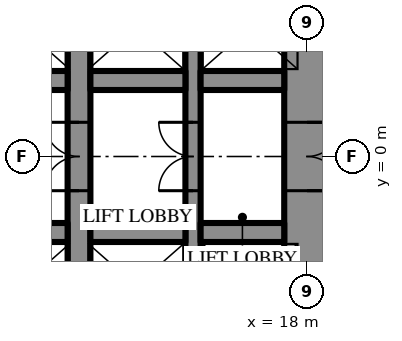
"""IFC4 building model, lengths in metres.
Left out: names, types, materials, properties, quantities, classifications, styles, units other than length and angle.
Written with IfcOpenShell. Run it as: python <this file> out.ifc"""

import sys

from ifc_helpers import new_model, si_unit, direction, frame, frame_2d, origin, place, context, subcontext, project, spatial, rectangle, extrude, element, fill, save


model = new_model("IFC4")
c1 = context("Model", 3, precision=1e-05, world=origin(), true_north=direction((0.0, 1.0)))
c2 = subcontext(c1, "Body", "Model", "MODEL_VIEW")
j1 = project(units=[si_unit("LENGTHUNIT", "METRE"), si_unit("PLANEANGLEUNIT", "RADIAN")], contexts=[c1])
p1 = place(None, origin())
s1 = spatial("IfcSite", under=j1, at=p1, CompositionType="ELEMENT")
p2 = place(p1, origin())
s2 = spatial("IfcBuilding", under=s1, at=p2, CompositionType="ELEMENT")
p3 = place(p2, frame((0.0, 0.0, 27.7)))
s3 = spatial("IfcBuildingStorey", under=s2, at=p3, CompositionType="ELEMENT", Elevation=27.7)
p4 = place(p3, frame((18.0, -10.7, 0.0), z_axis=(0.0, 0.0, 1.0), x_axis=(0.0, 1.0, 0.0)))
e1 = element("IfcWall", 1, at=p4, inside=s3, PredefinedType="SHEAR", context=c2, shape_type="SweptSolid", body=[
    extrude(rectangle(XDim=21.4, YDim=1.2, at=frame_2d((10.7, 0.0))), origin(), (0.0, 0.0, 1.0), 4.2),
])
p5 = place(p4, frame((9.8, 0.0, 0.0)))
e2 = element("IfcOpeningElement", 2, at=p5, cuts=e1, PredefinedType="OPENING", context=c2, shape_type="SweptSolid", body=[
    extrude(rectangle(XDim=1.8, YDim=2.4, at=frame_2d((0.9, 1.2))), frame((0.0, 0.61, 0.0), z_axis=(0.0, -1.0, 0.0), x_axis=(1.0, 0.0, 0.0)), (0.0, 0.0, 1.0), 1.22),
])
p6 = place(p3, frame((12.0, -10.7, 0.0), z_axis=(0.0, 0.0, 1.0), x_axis=(0.0, 1.0, 0.0)))
e3 = element("IfcWall", 3, at=p6, inside=s3, PredefinedType="SHEAR", context=c2, shape_type="SweptSolid", body=[
    extrude(rectangle(XDim=21.4, YDim=0.6, at=frame_2d((10.7, 0.0))), origin(), (0.0, 0.0, 1.0), 4.2),
])
p7 = place(p6, frame((9.8, 0.0, 0.0)))
e4 = element("IfcOpeningElement", 4, at=p7, cuts=e3, PredefinedType="OPENING", context=c2, shape_type="SweptSolid", body=[
    extrude(rectangle(XDim=1.8, YDim=2.4, at=frame_2d((0.9, 1.2))), frame((0.0, 0.31, 0.0), z_axis=(0.0, -1.0, 0.0), x_axis=(1.0, 0.0, 0.0)), (0.0, 0.0, 1.0), 0.62),
])
p8 = place(p3, frame((15.0, -10.7, 0.0), z_axis=(0.0, 0.0, 1.0), x_axis=(0.0, 1.0, 0.0)))
e5 = element("IfcWall", 5, at=p8, inside=s3, PredefinedType="SHEAR", context=c2, shape_type="SweptSolid", body=[
    extrude(rectangle(XDim=21.4, YDim=0.4, at=frame_2d((10.7, 0.0))), origin(), (0.0, 0.0, 1.0), 4.2),
])
p9 = place(p8, frame((9.8, 0.0, 0.0)))
e6 = element("IfcOpeningElement", 6, at=p9, cuts=e5, PredefinedType="OPENING", context=c2, shape_type="SweptSolid", body=[
    extrude(rectangle(XDim=1.8, YDim=2.4, at=frame_2d((0.9, 1.2))), frame((0.0, 0.21, 0.0), z_axis=(0.0, -1.0, 0.0), x_axis=(1.0, 0.0, 0.0)), (0.0, 0.0, 1.0), 0.42),
])
p10 = place(p3, frame((-3.2, 2.0, 0.0), z_axis=(0.0, 0.0, 1.0), x_axis=(1.0, 0.0, 0.0)))
e7 = element("IfcWall", 7, at=p10, inside=s3, PredefinedType="SHEAR", context=c2, shape_type="SweptSolid", body=[
    extrude(rectangle(XDim=14.9, YDim=0.5, at=frame_2d((7.45, 0.0))), origin(), (0.0, 0.0, 1.0), 4.2),
])
p11 = place(p10, frame((1.15, 0.0, 0.0)))
e8 = element("IfcOpeningElement", 8, at=p11, cuts=e7, PredefinedType="OPENING", context=c2, shape_type="SweptSolid", body=[
    extrude(rectangle(XDim=1.1, YDim=2.2, at=frame_2d((0.55, 1.1))), frame((0.0, 0.26, 0.0), z_axis=(0.0, -1.0, 0.0), x_axis=(1.0, 0.0, 0.0)), (0.0, 0.0, 1.0), 0.52),
])
p12 = place(p10, frame((4.15, 0.0, 0.0)))
e9 = element("IfcOpeningElement", 9, at=p12, cuts=e7, PredefinedType="OPENING", context=c2, shape_type="SweptSolid", body=[
    extrude(rectangle(XDim=1.1, YDim=2.2, at=frame_2d((0.55, 1.1))), frame((0.0, 0.26, 0.0), z_axis=(0.0, -1.0, 0.0), x_axis=(1.0, 0.0, 0.0)), (0.0, 0.0, 1.0), 0.52),
])
p13 = place(p10, frame((7.15, 0.0, 0.0)))
e10 = element("IfcOpeningElement", 10, at=p13, cuts=e7, PredefinedType="OPENING", context=c2, shape_type="SweptSolid", body=[
    extrude(rectangle(XDim=1.1, YDim=2.2, at=frame_2d((0.55, 1.1))), frame((0.0, 0.26, 0.0), z_axis=(0.0, -1.0, 0.0), x_axis=(1.0, 0.0, 0.0)), (0.0, 0.0, 1.0), 0.52),
])
p14 = place(p10, frame((10.15, 0.0, 0.0)))
e11 = element("IfcOpeningElement", 11, at=p14, cuts=e7, PredefinedType="OPENING", context=c2, shape_type="SweptSolid", body=[
    extrude(rectangle(XDim=1.1, YDim=2.2, at=frame_2d((0.55, 1.1))), frame((0.0, 0.26, 0.0), z_axis=(0.0, -1.0, 0.0), x_axis=(1.0, 0.0, 0.0)), (0.0, 0.0, 1.0), 0.52),
])
p15 = place(p3, frame((12.3, 2.0, 0.0), z_axis=(0.0, 0.0, 1.0), x_axis=(1.0, 0.0, 0.0)))
e12 = element("IfcWall", 12, at=p15, inside=s3, PredefinedType="SHEAR", context=c2, shape_type="SweptSolid", body=[
    extrude(rectangle(XDim=2.5, YDim=0.5, at=frame_2d((1.25, 0.0))), origin(), (0.0, 0.0, 1.0), 4.2),
])
for number, where, z_axis, x_axis in (
    (13, (15.2, 2.0, 0.0), (0.0, 0.0, 1.0), (1.0, 0.0, 0.0)),
    (14, (17.4, -2.0, 0.0), (0.0, 0.0, 1.0), (-1.0, 0.0, 0.0)),
):
    element("IfcWall", number, at=place(p3, frame(where, z_axis=z_axis, x_axis=x_axis)), inside=s3, PredefinedType="SHEAR", context=c2, shape_type="SweptSolid", body=[
        extrude(rectangle(XDim=2.2, YDim=0.5, at=frame_2d((1.1, 0.0))), origin(), (0.0, 0.0, 1.0), 4.2),
    ])
p16 = place(p3, frame((14.8, -2.0, 0.0), z_axis=(0.0, 0.0, 1.0), x_axis=(-1.0, 0.0, 0.0)))
e15 = element("IfcWall", 15, at=p16, inside=s3, PredefinedType="SHEAR", context=c2, shape_type="SweptSolid", body=[
    extrude(rectangle(XDim=2.5, YDim=0.5, at=frame_2d((1.25, 0.0))), origin(), (0.0, 0.0, 1.0), 4.2),
])
p17 = place(p3, frame((11.7, -2.0, 0.0), z_axis=(0.0, 0.0, 1.0), x_axis=(-1.0, 0.0, 0.0)))
e16 = element("IfcWall", 16, at=p17, inside=s3, PredefinedType="SHEAR", context=c2, shape_type="SweptSolid", body=[
    extrude(rectangle(XDim=5.9, YDim=0.5, at=frame_2d((2.95, 0.0))), origin(), (0.0, 0.0, 1.0), 4.2),
])
p18 = place(p5, frame((1.8, 0.0, 0.0), z_axis=(0.0, 0.0, 1.0), x_axis=(-1.0, 0.0, 0.0)))
e17 = element("IfcDoor", 17, at=p18, inside=s3, OperationType="DOUBLE_DOOR_SINGLE_SWING", PredefinedType="DOOR", context=c2, shape_type="SweptSolid", body=[
    extrude(rectangle(XDim=1.8, YDim=2.4, at=frame_2d((0.9, 1.2))), frame((0.0, 0.025, 0.0), z_axis=(0.0, -1.0, 0.0), x_axis=(1.0, 0.0, 0.0)), (0.0, 0.0, 1.0), 0.05),
])
fill(e2, e17)
p19 = place(p7, origin())
e18 = element("IfcDoor", 18, at=p19, inside=s3, OperationType="DOUBLE_DOOR_SINGLE_SWING", PredefinedType="DOOR", context=c2, shape_type="SweptSolid", body=[
    extrude(rectangle(XDim=1.8, YDim=2.4, at=frame_2d((0.9, 1.2))), frame((0.0, 0.025, 0.0), z_axis=(0.0, -1.0, 0.0), x_axis=(1.0, 0.0, 0.0)), (0.0, 0.0, 1.0), 0.05),
])
fill(e4, e18)
p20 = place(p9, origin())
e19 = element("IfcDoor", 19, at=p20, inside=s3, OperationType="DOUBLE_DOOR_SINGLE_SWING", PredefinedType="DOOR", context=c2, shape_type="SweptSolid", body=[
    extrude(rectangle(XDim=1.8, YDim=2.4, at=frame_2d((0.9, 1.2))), frame((0.0, 0.025, 0.0), z_axis=(0.0, -1.0, 0.0), x_axis=(1.0, 0.0, 0.0)), (0.0, 0.0, 1.0), 0.05),
])
fill(e6, e19)
save(model, sys.argv[1])
